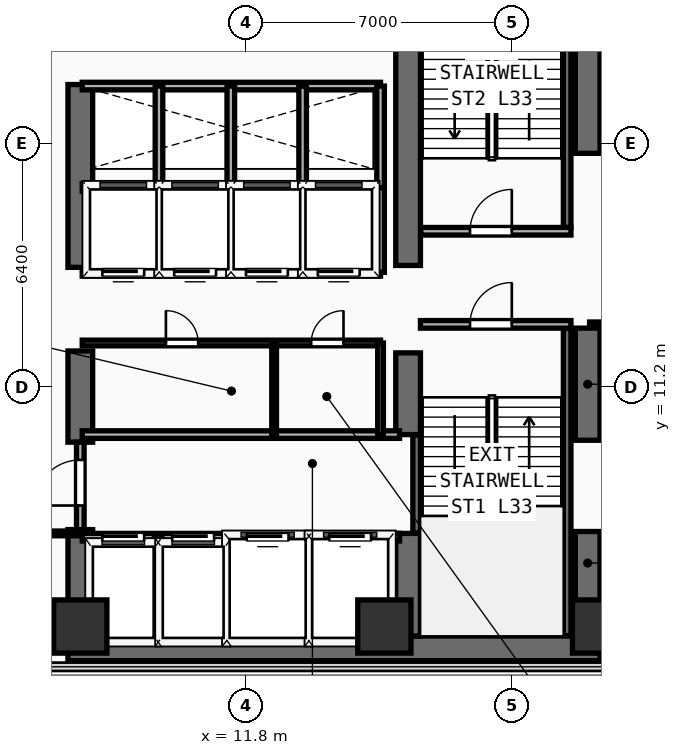
"""IFC4 building model, lengths in metres.
Left out: names, types, materials, properties, quantities, classifications, styles, units other than length and angle.
Written with IfcOpenShell. Run it as: python <this file> out.ifc"""

import sys

from ifc_helpers import new_model, si_unit, direction, frame, frame_2d, origin, origin_2d, place, context, subcontext, project, spatial, rectangle, extrude, element, fill, save


model = new_model("IFC4")
c1 = context("Model", 3, precision=1e-05, world=origin(), true_north=direction((0.0, 1.0)))
c2 = subcontext(c1, "Body", "Model", "MODEL_VIEW")
j1 = project(units=[si_unit("LENGTHUNIT", "METRE"), si_unit("PLANEANGLEUNIT", "RADIAN")], contexts=[c1])
p1 = place(None, origin())
s1 = spatial("IfcSite", under=j1, at=p1, CompositionType="ELEMENT")
p2 = place(p1, origin())
s2 = spatial("IfcBuilding", under=s1, at=p2, CompositionType="ELEMENT")
p3 = place(p2, frame((0.0, 0.0, 129.7)))
s3 = spatial("IfcBuildingStorey", under=s2, at=p3, CompositionType="ELEMENT", Elevation=129.7)
p4 = place(p3, frame((7.125, 4.325, 0.0), z_axis=(0.0, 0.0, 1.0), x_axis=(1.0, 0.0, 0.0)))
e1 = element("IfcWall", 1, at=p4, inside=s3, PredefinedType="SHEAR", context=c2, shape_type="SweptSolid", body=[
    extrude(rectangle(XDim=14.0, YDim=0.65, at=frame_2d((7.0, 0.0))), origin(), (0.0, 0.0, 1.0), 3.54),
])
p5 = place(p3, frame((7.45, 4.65, 0.0), z_axis=(0.0, 0.0, 1.0), x_axis=(0.0, 1.0, 0.0)))
e2 = element("IfcWall", 2, at=p5, inside=s3, PredefinedType="SHEAR", context=c2, shape_type="SweptSolid", body=[
    extrude(rectangle(XDim=2.8, YDim=0.65, at=frame_2d((1.4, 0.0))), origin(), (0.0, 0.0, 1.0), 3.54),
])
p6 = place(p3, frame((7.45, 9.75, 0.0), z_axis=(0.0, 0.0, 1.0), x_axis=(0.0, 1.0, 0.0)))
e3 = element("IfcWall", 3, at=p6, inside=s3, PredefinedType="SHEAR", context=c2, shape_type="SweptSolid", body=[
    extrude(rectangle(XDim=2.4, YDim=0.65, at=frame_2d((1.2, 0.0))), origin(), (0.0, 0.0, 1.0), 3.54),
])
p7 = place(p3, frame((7.45, 14.35, 0.0), z_axis=(0.0, 0.0, 1.0), x_axis=(0.0, 1.0, 0.0)))
e4 = element("IfcWall", 4, at=p7, inside=s3, PredefinedType="SHEAR", context=c2, shape_type="SweptSolid", body=[
    extrude(rectangle(XDim=4.81, YDim=0.65, at=frame_2d((2.405, 0.0))), origin(), (0.0, 0.0, 1.0), 3.54),
])
p8 = place(p3, frame((20.8, 4.65, 0.0), z_axis=(0.0, 0.0, 1.0), x_axis=(0.0, 1.0, 0.0)))
e5 = element("IfcWall", 5, at=p8, inside=s3, PredefinedType="SHEAR", context=c2, shape_type="SweptSolid", body=[
    extrude(rectangle(XDim=2.75, YDim=0.65, at=frame_2d((1.375, 0.0))), origin(), (0.0, 0.0, 1.0), 3.54),
])
p9 = place(p3, frame((20.8, 9.8, 0.0), z_axis=(0.0, 0.0, 1.0), x_axis=(0.0, 1.0, 0.0)))
e6 = element("IfcWall", 6, at=p9, inside=s3, PredefinedType="SHEAR", context=c2, shape_type="SweptSolid", body=[
    extrude(rectangle(XDim=2.95, YDim=0.65, at=frame_2d((1.475, 0.0))), origin(), (0.0, 0.0, 1.0), 3.54),
])
p10 = place(p3, frame((20.8, 17.35, 0.0), z_axis=(0.0, 0.0, 1.0), x_axis=(0.0, 1.0, 0.0)))
e7 = element("IfcWall", 7, at=p10, inside=s3, PredefinedType="SHEAR", context=c2, shape_type="SweptSolid", body=[
    extrude(rectangle(XDim=6.15, YDim=0.65, at=frame_2d((3.075, 0.0))), origin(), (0.0, 0.0, 1.0), 3.54),
])
p11 = place(p3, frame((16.075, 4.65, 0.0), z_axis=(0.0, 0.0, 1.0), x_axis=(0.0, 1.0, 0.0)))
e8 = element("IfcWall", 8, at=p11, inside=s3, PredefinedType="SHEAR", context=c2, shape_type="SweptSolid", body=[
    extrude(rectangle(XDim=2.7, YDim=0.65, at=frame_2d((1.35, 0.0))), origin(), (0.0, 0.0, 1.0), 3.54),
])
p12 = place(p3, frame((16.075, 9.95, 0.0), z_axis=(0.0, 0.0, 1.0), x_axis=(0.0, 1.0, 0.0)))
e9 = element("IfcWall", 9, at=p12, inside=s3, PredefinedType="SHEAR", context=c2, shape_type="SweptSolid", body=[
    extrude(rectangle(XDim=2.15, YDim=0.65, at=frame_2d((1.075, 0.0))), origin(), (0.0, 0.0, 1.0), 3.54),
])
p13 = place(p3, frame((16.075, 14.4, 0.0), z_axis=(0.0, 0.0, 1.0), x_axis=(0.0, 1.0, 0.0)))
e10 = element("IfcWall", 10, at=p13, inside=s3, PredefinedType="SHEAR", context=c2, shape_type="SweptSolid", body=[
    extrude(rectangle(XDim=9.1, YDim=0.65, at=frame_2d((4.55, 0.0))), origin(), (0.0, 0.0, 1.0), 3.54),
])
for number, where, z_axis, x_axis in (
    (11, (7.45, 4.9, 0.0), (0.0, 0.0, 1.0), (1.0, 0.0, 0.0)),
    (12, (15.45, 4.9, 0.0), (0.0, 0.0, 1.0), (1.0, 0.0, 0.0)),
    (13, (21.1, 4.9, 0.0), (0.0, 0.0, 1.0), (1.0, 0.0, 0.0)),
):
    element("IfcColumn", number, at=place(p3, frame(where, z_axis=z_axis, x_axis=x_axis)), inside=s3, PredefinedType="COLUMN", context=c2, shape_type="SweptSolid", body=[
        extrude(rectangle(XDim=1.4, YDim=1.4, at=origin_2d()), origin(), (0.0, 0.0, 1.0), 3.54),
    ])
p14 = place(p3, frame((16.3, 7.36, 0.0), z_axis=(0.0, 0.0, 1.0), x_axis=(0.0, 1.0, 0.0)))
e14 = element("IfcWall", 14, at=p14, inside=s3, PredefinedType="SHEAR", context=c2, shape_type="SweptSolid", body=[
    extrude(rectangle(XDim=2.58, YDim=0.2, at=frame_2d((1.29, 0.0))), origin(), (0.0, 0.0, 1.0), 3.54),
])
p15 = place(p3, frame((20.26, 4.66, 0.0), z_axis=(0.0, 0.0, 1.0), x_axis=(0.0, 1.0, 0.0)))
e15 = element("IfcWall", 15, at=p15, inside=s3, PredefinedType="SHEAR", context=c2, shape_type="SweptSolid", body=[
    extrude(rectangle(XDim=8.09, YDim=0.2, at=frame_2d((4.045, 0.0))), origin(), (0.0, 0.0, 1.0), 3.54),
])
p16 = place(p3, frame((16.4, 12.85, 0.0), z_axis=(0.0, 0.0, 1.0), x_axis=(1.0, 0.0, 0.0)))
e16 = element("IfcWall", 16, at=p16, inside=s3, PredefinedType="PARTITIONING", context=c2, shape_type="SweptSolid", body=[
    extrude(rectangle(XDim=3.96, YDim=0.2, at=frame_2d((1.98, 0.0))), origin(), (0.0, 0.0, 1.0), 3.54),
])
p17 = place(p16, frame((1.304, 0.0, 0.0)))
e17 = element("IfcOpeningElement", 17, at=p17, cuts=e16, PredefinedType="OPENING", context=c2, shape_type="SweptSolid", body=[
    extrude(rectangle(XDim=1.1, YDim=2.2, at=frame_2d((0.55, 1.1))), frame((0.0, 0.11, 0.0), z_axis=(0.0, -1.0, 0.0), x_axis=(1.0, 0.0, 0.0)), (0.0, 0.0, 1.0), 0.22),
])
p18 = place(p3, frame((20.26, 15.4, 0.0), z_axis=(0.0, 0.0, 1.0), x_axis=(0.0, 1.0, 0.0)))
e18 = element("IfcWall", 18, at=p18, inside=s3, PredefinedType="SHEAR", context=c2, shape_type="SweptSolid", body=[
    extrude(rectangle(XDim=8.09, YDim=0.2, at=frame_2d((4.045, 0.0))), origin(), (0.0, 0.0, 1.0), 3.54),
])
p19 = place(p3, frame((16.41, 15.3, 0.0), z_axis=(0.0, 0.0, 1.0), x_axis=(1.0, 0.0, 0.0)))
e19 = element("IfcWall", 19, at=p19, inside=s3, PredefinedType="PARTITIONING", context=c2, shape_type="SweptSolid", body=[
    extrude(rectangle(XDim=3.95, YDim=0.2, at=frame_2d((1.975, 0.0))), origin(), (0.0, 0.0, 1.0), 3.54),
])
p20 = place(p19, frame((1.294, 0.0, 0.0)))
e20 = element("IfcOpeningElement", 20, at=p20, cuts=e19, PredefinedType="OPENING", context=c2, shape_type="SweptSolid", body=[
    extrude(rectangle(XDim=1.1, YDim=2.2, at=frame_2d((0.55, 1.1))), frame((0.0, 0.11, 0.0), z_axis=(0.0, -1.0, 0.0), x_axis=(1.0, 0.0, 0.0)), (0.0, 0.0, 1.0), 0.22),
])
p21 = place(p3, frame((7.5, 7.25, 0.0), z_axis=(0.0, 0.0, 1.0), x_axis=(1.0, 0.0, 0.0)))
e21 = element("IfcWall", 21, at=p21, inside=s3, PredefinedType="PARTITIONING", context=c2, shape_type="SweptSolid", body=[
    extrude(rectangle(XDim=8.35, YDim=0.2, at=frame_2d((4.175, 0.0))), origin(), (0.0, 0.0, 1.0), 3.54),
])
p22 = place(p21, frame((0.53, 0.0, 0.0)))
e22 = element("IfcOpeningElement", 22, at=p22, cuts=e21, PredefinedType="OPENING", context=c2, shape_type="SweptSolid", body=[
    extrude(rectangle(XDim=1.1, YDim=2.2, at=frame_2d((0.55, 1.1))), frame((0.0, 0.11, 0.0), z_axis=(0.0, -1.0, 0.0), x_axis=(1.0, 0.0, 0.0)), (0.0, 0.0, 1.0), 0.22),
])
p23 = place(p21, frame((2.37, 0.0, 0.0)))
e23 = element("IfcOpeningElement", 23, at=p23, cuts=e21, PredefinedType="OPENING", context=c2, shape_type="SweptSolid", body=[
    extrude(rectangle(XDim=1.1, YDim=2.2, at=frame_2d((0.55, 1.1))), frame((0.0, 0.11, 0.0), z_axis=(0.0, -1.0, 0.0), x_axis=(1.0, 0.0, 0.0)), (0.0, 0.0, 1.0), 0.22),
])
p24 = place(p21, frame((4.33, 0.0, 0.0)))
e24 = element("IfcOpeningElement", 24, at=p24, cuts=e21, PredefinedType="OPENING", context=c2, shape_type="SweptSolid", body=[
    extrude(rectangle(XDim=1.1, YDim=2.2, at=frame_2d((0.55, 1.1))), frame((0.0, 0.11, 0.0), z_axis=(0.0, -1.0, 0.0), x_axis=(1.0, 0.0, 0.0)), (0.0, 0.0, 1.0), 0.22),
])
p25 = place(p21, frame((6.5, 0.0, 0.0)))
e25 = element("IfcOpeningElement", 25, at=p25, cuts=e21, PredefinedType="OPENING", context=c2, shape_type="SweptSolid", body=[
    extrude(rectangle(XDim=1.1, YDim=2.2, at=frame_2d((0.55, 1.1))), frame((0.0, 0.11, 0.0), z_axis=(0.0, -1.0, 0.0), x_axis=(1.0, 0.0, 0.0)), (0.0, 0.0, 1.0), 0.22),
])
p26 = place(p3, frame((7.5, 9.95, 0.0), z_axis=(0.0, 0.0, 1.0), x_axis=(1.0, 0.0, 0.0)))
e26 = element("IfcWall", 26, at=p26, inside=s3, PredefinedType="PARTITIONING", context=c2, shape_type="SweptSolid", body=[
    extrude(rectangle(XDim=8.35, YDim=0.2, at=frame_2d((4.175, 0.0))), origin(), (0.0, 0.0, 1.0), 3.54),
])
for number, where, z_axis, x_axis in (
    (27, (9.5, 4.45, 0.0), (0.0, 0.0, 1.0), (0.0, 1.0, 0.0)),
    (28, (11.36, 4.45, 0.0), (0.0, 0.0, 1.0), (0.0, 1.0, 0.0)),
    (29, (13.46, 4.45, 0.0), (0.0, 0.0, 1.0), (0.0, 1.0, 0.0)),
):
    element("IfcWall", number, at=place(p3, frame(where, z_axis=z_axis, x_axis=x_axis)), inside=s3, PredefinedType="PARTITIONING", context=c2, shape_type="SweptSolid", body=[
        extrude(rectangle(XDim=2.8, YDim=0.2, at=frame_2d((1.4, 0.0))), origin(), (0.0, 0.0, 1.0), 3.54),
    ])
p27 = place(p3, frame((7.45, 7.45, 0.0), z_axis=(0.0, 0.0, 1.0), x_axis=(0.0, 1.0, 0.0)))
e30 = element("IfcWall", 30, at=p27, inside=s3, PredefinedType="PARTITIONING", context=c2, shape_type="SweptSolid", body=[
    extrude(rectangle(XDim=2.3, YDim=0.2, at=frame_2d((1.15, 0.0))), origin(), (0.0, 0.0, 1.0), 2.52),
])
p28 = place(p27, frame((0.633, 0.0, 0.0)))
e31 = element("IfcOpeningElement", 31, at=p28, cuts=e30, PredefinedType="OPENING", context=c2, shape_type="SweptSolid", body=[
    extrude(rectangle(XDim=1.2, YDim=2.25, at=frame_2d((0.6, 1.125))), frame((0.0, 0.11, 0.0), z_axis=(0.0, -1.0, 0.0), x_axis=(1.0, 0.0, 0.0)), (0.0, 0.0, 1.0), 0.22),
])
p29 = place(p3, frame((7.5, 12.36, 0.0), z_axis=(0.0, 0.0, 1.0), x_axis=(1.0, 0.0, 0.0)))
e32 = element("IfcWall", 32, at=p29, inside=s3, PredefinedType="PARTITIONING", context=c2, shape_type="SweptSolid", body=[
    extrude(rectangle(XDim=7.85, YDim=0.15, at=frame_2d((3.925, 0.0))), origin(), (0.0, 0.0, 1.0), 3.54),
])
p30 = place(p29, frame((2.202, 0.0, 0.0)))
e33 = element("IfcOpeningElement", 33, at=p30, cuts=e32, PredefinedType="OPENING", context=c2, shape_type="SweptSolid", body=[
    extrude(rectangle(XDim=0.85, YDim=2.15, at=frame_2d((0.425, 1.075))), frame((0.0, 0.085, 0.0), z_axis=(0.0, -1.0, 0.0), x_axis=(1.0, 0.0, 0.0)), (0.0, 0.0, 1.0), 0.17),
])
p31 = place(p29, frame((6.025, 0.0, 0.0)))
e34 = element("IfcOpeningElement", 34, at=p31, cuts=e32, PredefinedType="OPENING", context=c2, shape_type="SweptSolid", body=[
    extrude(rectangle(XDim=0.85, YDim=2.15, at=frame_2d((0.425, 1.075))), frame((0.0, 0.085, 0.0), z_axis=(0.0, -1.0, 0.0), x_axis=(1.0, 0.0, 0.0)), (0.0, 0.0, 1.0), 0.17),
])
p32 = place(p3, frame((15.35, 9.95, 0.0), z_axis=(0.0, 0.0, 1.0), x_axis=(0.0, 1.0, 0.0)))
e35 = element("IfcWall", 35, at=p32, inside=s3, PredefinedType="PARTITIONING", context=c2, shape_type="SweptSolid", body=[
    extrude(rectangle(XDim=2.41, YDim=0.15, at=frame_2d((1.205, 0.0))), origin(), (0.0, 0.0, 1.0), 3.54),
])
p33 = place(p3, frame((12.55, 9.95, 0.0), z_axis=(0.0, 0.0, 1.0), x_axis=(0.0, 1.0, 0.0)))
e36 = element("IfcWall", 36, at=p33, inside=s3, PredefinedType="PARTITIONING", context=c2, shape_type="SweptSolid", body=[
    extrude(rectangle(XDim=2.41, YDim=0.125, at=frame_2d((1.205, 0.0))), origin(), (0.0, 0.0, 1.0), 3.54),
])
p34 = place(p3, frame((7.5, 14.22, 0.0), z_axis=(0.0, 0.0, 1.0), x_axis=(1.0, 0.0, 0.0)))
e37 = element("IfcWall", 37, at=p34, inside=s3, PredefinedType="PARTITIONING", context=c2, shape_type="SweptSolid", body=[
    extrude(rectangle(XDim=7.85, YDim=0.2, at=frame_2d((3.925, 0.0))), origin(), (0.0, 0.0, 1.0), 3.54),
])
p35 = place(p34, frame((0.53, 0.0, 0.0)))
e38 = element("IfcOpeningElement", 38, at=p35, cuts=e37, PredefinedType="OPENING", context=c2, shape_type="SweptSolid", body=[
    extrude(rectangle(XDim=1.1, YDim=2.2, at=frame_2d((0.55, 1.1))), frame((0.0, 0.11, 0.0), z_axis=(0.0, -1.0, 0.0), x_axis=(1.0, 0.0, 0.0)), (0.0, 0.0, 1.0), 0.22),
])
p36 = place(p34, frame((2.42, 0.0, 0.0)))
e39 = element("IfcOpeningElement", 39, at=p36, cuts=e37, PredefinedType="OPENING", context=c2, shape_type="SweptSolid", body=[
    extrude(rectangle(XDim=1.1, YDim=2.2, at=frame_2d((0.55, 1.1))), frame((0.0, 0.11, 0.0), z_axis=(0.0, -1.0, 0.0), x_axis=(1.0, 0.0, 0.0)), (0.0, 0.0, 1.0), 0.22),
])
p37 = place(p34, frame((4.31, 0.0, 0.0)))
e40 = element("IfcOpeningElement", 40, at=p37, cuts=e37, PredefinedType="OPENING", context=c2, shape_type="SweptSolid", body=[
    extrude(rectangle(XDim=1.1, YDim=2.2, at=frame_2d((0.55, 1.1))), frame((0.0, 0.11, 0.0), z_axis=(0.0, -1.0, 0.0), x_axis=(1.0, 0.0, 0.0)), (0.0, 0.0, 1.0), 0.22),
])
p38 = place(p34, frame((6.2, 0.0, 0.0)))
e41 = element("IfcOpeningElement", 41, at=p38, cuts=e37, PredefinedType="OPENING", context=c2, shape_type="SweptSolid", body=[
    extrude(rectangle(XDim=1.1, YDim=2.2, at=frame_2d((0.55, 1.1))), frame((0.0, 0.11, 0.0), z_axis=(0.0, -1.0, 0.0), x_axis=(1.0, 0.0, 0.0)), (0.0, 0.0, 1.0), 0.22),
])
p39 = place(p3, frame((7.5, 16.45, 0.0), z_axis=(0.0, 0.0, 1.0), x_axis=(1.0, 0.0, 0.0)))
e42 = element("IfcWall", 42, at=p39, inside=s3, PredefinedType="PARTITIONING", context=c2, shape_type="SweptSolid", body=[
    extrude(rectangle(XDim=7.85, YDim=0.2, at=frame_2d((3.925, 0.0))), origin(), (0.0, 0.0, 1.0), 3.54),
])
for number, where, z_axis, x_axis in (
    (43, (15.35, 14.22, 0.0), (0.0, 0.0, 1.0), (0.0, 1.0, 0.0)),
    (44, (9.52, 14.22, 0.0), (0.0, 0.0, 1.0), (0.0, 1.0, 0.0)),
    (45, (11.41, 14.22, 0.0), (0.0, 0.0, 1.0), (0.0, 1.0, 0.0)),
    (46, (13.3, 14.22, 0.0), (0.0, 0.0, 1.0), (0.0, 1.0, 0.0)),
):
    element("IfcWall", number, at=place(p3, frame(where, z_axis=z_axis, x_axis=x_axis)), inside=s3, PredefinedType="PARTITIONING", context=c2, shape_type="SweptSolid", body=[
        extrude(rectangle(XDim=2.23, YDim=0.2, at=frame_2d((1.115, 0.0))), origin(), (0.0, 0.0, 1.0), 3.54),
    ])
p40 = place(p3, frame((7.5, 19.12, 0.0), z_axis=(0.0, 0.0, 1.0), x_axis=(1.0, 0.0, 0.0)))
e47 = element("IfcWall", 47, at=p40, inside=s3, PredefinedType="PARTITIONING", context=c2, shape_type="SweptSolid", body=[
    extrude(rectangle(XDim=7.85, YDim=0.2, at=frame_2d((3.925, 0.0))), origin(), (0.0, 0.0, 1.0), 3.54),
])
for number, where, z_axis, x_axis in (
    (48, (15.35, 16.45, 0.0), (0.0, 0.0, 1.0), (0.0, 1.0, 0.0)),
    (49, (9.52, 16.45, 0.0), (0.0, 0.0, 1.0), (0.0, 1.0, 0.0)),
    (50, (11.41, 16.45, 0.0), (0.0, 0.0, 1.0), (0.0, 1.0, 0.0)),
    (51, (13.3, 16.45, 0.0), (0.0, 0.0, 1.0), (0.0, 1.0, 0.0)),
):
    element("IfcWall", number, at=place(p3, frame(where, z_axis=z_axis, x_axis=x_axis)), inside=s3, PredefinedType="PARTITIONING", context=c2, shape_type="SweptSolid", body=[
        extrude(rectangle(XDim=2.67, YDim=0.2, at=frame_2d((1.335, 0.0))), origin(), (0.0, 0.0, 1.0), 3.54),
    ])
p41 = place(p3, frame((1.64, 7.35, 0.0), z_axis=(0.0, 0.0, 1.0), x_axis=(1.0, 0.0, 0.0)))
e52 = element("IfcWall", 52, at=p41, inside=s3, PredefinedType="PARTITIONING", context=c2, shape_type="SweptSolid", body=[
    extrude(rectangle(XDim=5.76, YDim=0.125, at=frame_2d((2.88, 0.0))), origin(), (0.0, 0.0, 1.0), 3.54),
])
p42 = place(p41, frame((4.087, 0.0, 0.0)))
e53 = element("IfcOpeningElement", 53, at=p42, cuts=e52, PredefinedType="OPENING", context=c2, shape_type="SweptSolid", body=[
    extrude(rectangle(XDim=0.85, YDim=2.15, at=frame_2d((0.425, 1.075))), frame((0.0, 0.073, 0.0), z_axis=(0.0, -1.0, 0.0), x_axis=(1.0, 0.0, 0.0)), (0.0, 0.0, 1.0), 0.145),
])
p43 = place(p3, frame((20.85, 12.85, 0.0), z_axis=(0.0, 0.0, 1.0), x_axis=(1.0, 0.0, 0.0)))
e54 = element("IfcWall", 54, at=p43, inside=s3, PredefinedType="PARTITIONING", context=c2, shape_type="SweptSolid", body=[
    extrude(rectangle(XDim=7.05, YDim=0.125, at=frame_2d((3.525, 0.0))), origin(), (0.0, 0.0, 1.0), 3.54),
])
p44 = place(p43, frame((2.8, 0.0, 0.0)))
e55 = element("IfcOpeningElement", 55, at=p44, cuts=e54, PredefinedType="OPENING", context=c2, shape_type="SweptSolid", body=[
    extrude(rectangle(XDim=0.95, YDim=2.15, at=frame_2d((0.475, 1.075))), frame((0.0, 0.073, 0.0), z_axis=(0.0, -1.0, 0.0), x_axis=(1.0, 0.0, 0.0)), (0.0, 0.0, 1.0), 0.145),
])
p45 = place(p17, frame((1.1, 0.0, 0.0), z_axis=(0.0, 0.0, 1.0), x_axis=(-1.0, 0.0, 0.0)))
e56 = element("IfcDoor", 56, at=p45, inside=s3, OperationType="SINGLE_SWING_LEFT", PredefinedType="DOOR", context=c2, shape_type="SweptSolid", body=[
    extrude(rectangle(XDim=1.1, YDim=2.2, at=frame_2d((0.55, 1.1))), frame((0.0, 0.025, 0.0), z_axis=(0.0, -1.0, 0.0), x_axis=(1.0, 0.0, 0.0)), (0.0, 0.0, 1.0), 0.05),
])
fill(e17, e56)
p46 = place(p20, origin())
e57 = element("IfcDoor", 57, at=p46, inside=s3, OperationType="SINGLE_SWING_RIGHT", PredefinedType="DOOR", context=c2, shape_type="SweptSolid", body=[
    extrude(rectangle(XDim=1.1, YDim=2.2, at=frame_2d((0.55, 1.1))), frame((0.0, 0.025, 0.0), z_axis=(0.0, -1.0, 0.0), x_axis=(1.0, 0.0, 0.0)), (0.0, 0.0, 1.0), 0.05),
])
fill(e20, e57)
p47 = place(p22, origin())
e58 = element("IfcDoor", 58, at=p47, inside=s3, OperationType="SLIDING_TO_LEFT", PredefinedType="DOOR", context=c2, shape_type="SweptSolid", body=[
    extrude(rectangle(XDim=1.1, YDim=2.2, at=frame_2d((0.55, 1.1))), frame((0.0, 0.025, 0.0), z_axis=(0.0, -1.0, 0.0), x_axis=(1.0, 0.0, 0.0)), (0.0, 0.0, 1.0), 0.05),
])
fill(e22, e58)
p48 = place(p23, origin())
e59 = element("IfcDoor", 59, at=p48, inside=s3, OperationType="SLIDING_TO_LEFT", PredefinedType="DOOR", context=c2, shape_type="SweptSolid", body=[
    extrude(rectangle(XDim=1.1, YDim=2.2, at=frame_2d((0.55, 1.1))), frame((0.0, 0.025, 0.0), z_axis=(0.0, -1.0, 0.0), x_axis=(1.0, 0.0, 0.0)), (0.0, 0.0, 1.0), 0.05),
])
fill(e23, e59)
p49 = place(p24, origin())
e60 = element("IfcDoor", 60, at=p49, inside=s3, OperationType="SLIDING_TO_LEFT", PredefinedType="DOOR", context=c2, shape_type="SweptSolid", body=[
    extrude(rectangle(XDim=1.1, YDim=2.2, at=frame_2d((0.55, 1.1))), frame((0.0, 0.025, 0.0), z_axis=(0.0, -1.0, 0.0), x_axis=(1.0, 0.0, 0.0)), (0.0, 0.0, 1.0), 0.05),
])
fill(e24, e60)
p50 = place(p25, origin())
e61 = element("IfcDoor", 61, at=p50, inside=s3, OperationType="SLIDING_TO_LEFT", PredefinedType="DOOR", context=c2, shape_type="SweptSolid", body=[
    extrude(rectangle(XDim=1.1, YDim=2.2, at=frame_2d((0.55, 1.1))), frame((0.0, 0.025, 0.0), z_axis=(0.0, -1.0, 0.0), x_axis=(1.0, 0.0, 0.0)), (0.0, 0.0, 1.0), 0.05),
])
fill(e25, e61)
p51 = place(p28, frame((1.2, 0.0, 0.0), z_axis=(0.0, 0.0, 1.0), x_axis=(-1.0, 0.0, 0.0)))
e62 = element("IfcDoor", 62, at=p51, inside=s3, OperationType="SINGLE_SWING_RIGHT", PredefinedType="DOOR", context=c2, shape_type="SweptSolid", body=[
    extrude(rectangle(XDim=1.2, YDim=2.25, at=frame_2d((0.6, 1.125))), frame((0.0, 0.025, 0.0), z_axis=(0.0, -1.0, 0.0), x_axis=(1.0, 0.0, 0.0)), (0.0, 0.0, 1.0), 0.05),
])
fill(e31, e62)
p52 = place(p30, origin())
e63 = element("IfcDoor", 63, at=p52, inside=s3, OperationType="SINGLE_SWING_LEFT", PredefinedType="DOOR", context=c2, shape_type="SweptSolid", body=[
    extrude(rectangle(XDim=0.85, YDim=2.15, at=frame_2d((0.425, 1.075))), frame((0.0, 0.025, 0.0), z_axis=(0.0, -1.0, 0.0), x_axis=(1.0, 0.0, 0.0)), (0.0, 0.0, 1.0), 0.05),
])
fill(e33, e63)
p53 = place(p31, origin())
e64 = element("IfcDoor", 64, at=p53, inside=s3, OperationType="SINGLE_SWING_RIGHT", PredefinedType="DOOR", context=c2, shape_type="SweptSolid", body=[
    extrude(rectangle(XDim=0.85, YDim=2.15, at=frame_2d((0.425, 1.075))), frame((0.0, 0.025, 0.0), z_axis=(0.0, -1.0, 0.0), x_axis=(1.0, 0.0, 0.0)), (0.0, 0.0, 1.0), 0.05),
])
fill(e34, e64)
p54 = place(p35, frame((1.1, 0.0, 0.0), z_axis=(0.0, 0.0, 1.0), x_axis=(-1.0, 0.0, 0.0)))
e65 = element("IfcDoor", 65, at=p54, inside=s3, OperationType="SLIDING_TO_LEFT", PredefinedType="DOOR", context=c2, shape_type="SweptSolid", body=[
    extrude(rectangle(XDim=1.1, YDim=2.2, at=frame_2d((0.55, 1.1))), frame((0.0, 0.025, 0.0), z_axis=(0.0, -1.0, 0.0), x_axis=(1.0, 0.0, 0.0)), (0.0, 0.0, 1.0), 0.05),
])
fill(e38, e65)
p55 = place(p36, frame((1.1, 0.0, 0.0), z_axis=(0.0, 0.0, 1.0), x_axis=(-1.0, 0.0, 0.0)))
e66 = element("IfcDoor", 66, at=p55, inside=s3, OperationType="SLIDING_TO_LEFT", PredefinedType="DOOR", context=c2, shape_type="SweptSolid", body=[
    extrude(rectangle(XDim=1.1, YDim=2.2, at=frame_2d((0.55, 1.1))), frame((0.0, 0.025, 0.0), z_axis=(0.0, -1.0, 0.0), x_axis=(1.0, 0.0, 0.0)), (0.0, 0.0, 1.0), 0.05),
])
fill(e39, e66)
p56 = place(p37, frame((1.1, 0.0, 0.0), z_axis=(0.0, 0.0, 1.0), x_axis=(-1.0, 0.0, 0.0)))
e67 = element("IfcDoor", 67, at=p56, inside=s3, OperationType="SLIDING_TO_LEFT", PredefinedType="DOOR", context=c2, shape_type="SweptSolid", body=[
    extrude(rectangle(XDim=1.1, YDim=2.2, at=frame_2d((0.55, 1.1))), frame((0.0, 0.025, 0.0), z_axis=(0.0, -1.0, 0.0), x_axis=(1.0, 0.0, 0.0)), (0.0, 0.0, 1.0), 0.05),
])
fill(e40, e67)
p57 = place(p38, frame((1.1, 0.0, 0.0), z_axis=(0.0, 0.0, 1.0), x_axis=(-1.0, 0.0, 0.0)))
e68 = element("IfcDoor", 68, at=p57, inside=s3, OperationType="SLIDING_TO_LEFT", PredefinedType="DOOR", context=c2, shape_type="SweptSolid", body=[
    extrude(rectangle(XDim=1.1, YDim=2.2, at=frame_2d((0.55, 1.1))), frame((0.0, 0.025, 0.0), z_axis=(0.0, -1.0, 0.0), x_axis=(1.0, 0.0, 0.0)), (0.0, 0.0, 1.0), 0.05),
])
fill(e41, e68)
save(model, sys.argv[1])
